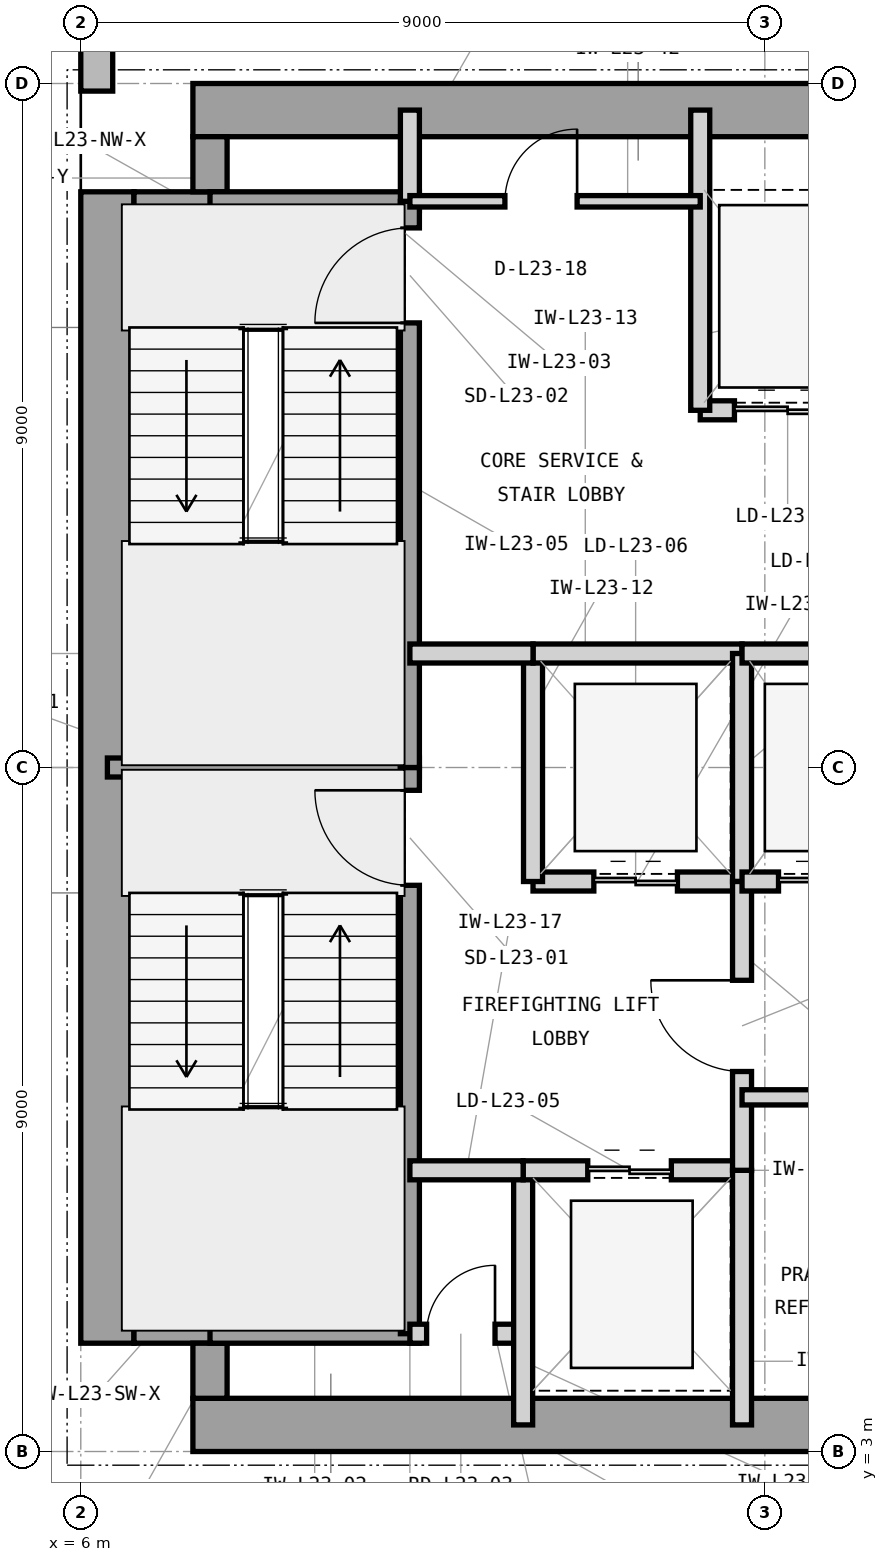
"""IFC4 building model, lengths in metres.
Left out: names, types, materials, properties, quantities, classifications, styles, units other than length and angle.
Written with IfcOpenShell. Run it as: python <this file> out.ifc"""

import sys

from ifc_helpers import new_model, si_unit, direction, frame, frame_2d, origin, place, context, subcontext, project, spatial, rectangle, extrude, element, fill, save


model = new_model("IFC4")
c1 = context("Model", 3, precision=1e-05, world=origin(), true_north=direction((0.0, 1.0)))
c2 = subcontext(c1, "Body", "Model", "MODEL_VIEW")
j1 = project(units=[si_unit("LENGTHUNIT", "METRE"), si_unit("PLANEANGLEUNIT", "RADIAN")], contexts=[c1])
p1 = place(None, origin())
s1 = spatial("IfcSite", under=j1, at=p1, CompositionType="ELEMENT")
p2 = place(p1, origin())
s2 = spatial("IfcBuilding", under=s1, at=p2, CompositionType="ELEMENT")
p3 = place(p2, frame((0.0, 0.0, 101.1)))
s3 = spatial("IfcBuildingStorey", under=s2, at=p3, CompositionType="ELEMENT", Elevation=101.1)
p4 = place(p3, frame((7.475, 3.35, 0.0), z_axis=(0.0, 0.0, 1.0), x_axis=(1.0, 0.0, 0.0)))
e1 = element("IfcWall", 1, at=p4, inside=s3, PredefinedType="SHEAR", context=c2, shape_type="SweptSolid", body=[
    extrude(rectangle(XDim=16.525, YDim=0.7, at=frame_2d((8.262, 0.0))), origin(), (0.0, 0.0, 1.0), 3.9),
])
p5 = place(p3, frame((6.35, 4.425, 0.0), z_axis=(0.0, 0.0, 1.0), x_axis=(0.0, 1.0, 0.0)))
e2 = element("IfcWall", 2, at=p5, inside=s3, PredefinedType="SHEAR", context=c2, shape_type="SweptSolid", body=[
    extrude(rectangle(XDim=15.15, YDim=0.7, at=frame_2d((7.575, 0.0))), origin(), (0.0, 0.0, 1.0), 3.9),
])
p6 = place(p3, frame((7.475, 20.65, 0.0), z_axis=(0.0, 0.0, 1.0), x_axis=(1.0, 0.0, 0.0)))
e3 = element("IfcWall", 3, at=p6, inside=s3, PredefinedType="SHEAR", context=c2, shape_type="SweptSolid", body=[
    extrude(rectangle(XDim=12.325, YDim=0.7, at=frame_2d((6.163, 0.0))), origin(), (0.0, 0.0, 1.0), 3.9),
])
p7 = place(p3, frame((6.7, 4.65, 0.0), z_axis=(0.0, 0.0, 1.0), x_axis=(1.0, 0.0, 0.0)))
e4 = element("IfcWall", 4, at=p7, inside=s3, PredefinedType="SHEAR", context=c2, shape_type="SweptSolid", body=[
    extrude(rectangle(XDim=1.225, YDim=0.45, at=frame_2d((0.613, 0.0))), origin(), (0.0, 0.0, 1.0), 3.9),
])
p8 = place(p3, frame((7.7, 3.7, 0.0), z_axis=(0.0, 0.0, 1.0), x_axis=(0.0, 1.0, 0.0)))
e5 = element("IfcWall", 5, at=p8, inside=s3, PredefinedType="SHEAR", context=c2, shape_type="SweptSolid", body=[
    extrude(rectangle(XDim=0.725, YDim=0.45, at=frame_2d((0.363, 0.0))), origin(), (0.0, 0.0, 1.0), 3.9),
])
p9 = place(p3, frame((6.7, 19.35, 0.0), z_axis=(0.0, 0.0, 1.0), x_axis=(1.0, 0.0, 0.0)))
e6 = element("IfcWall", 6, at=p9, inside=s3, PredefinedType="SHEAR", context=c2, shape_type="SweptSolid", body=[
    extrude(rectangle(XDim=1.225, YDim=0.45, at=frame_2d((0.613, 0.0))), origin(), (0.0, 0.0, 1.0), 3.9),
])
p10 = place(p3, frame((7.7, 19.575, 0.0), z_axis=(0.0, 0.0, 1.0), x_axis=(0.0, 1.0, 0.0)))
e7 = element("IfcWall", 7, at=p10, inside=s3, PredefinedType="SHEAR", context=c2, shape_type="SweptSolid", body=[
    extrude(rectangle(XDim=0.725, YDim=0.45, at=frame_2d((0.363, 0.0))), origin(), (0.0, 0.0, 1.0), 3.9),
])
p11 = place(p3, frame((6.21, 46.4, 0.0), z_axis=(0.0, 0.0, 1.0), x_axis=(0.0, -1.0, 0.0)))
e8 = element("IfcWall", 8, at=p11, inside=s3, PredefinedType="STANDARD", context=c2, shape_type="SweptSolid", body=[
    extrude(rectangle(XDim=25.5, YDim=0.42, at=frame_2d((12.75, 0.0))), origin(), (0.0, 0.0, 1.0), 3.7),
])
p12 = place(p11, frame((11.5, 0.0, 0.85)))
e9 = element("IfcOpeningElement", 9, at=p12, cuts=e8, PredefinedType="OPENING", context=c2, shape_type="SweptSolid", body=[
    extrude(rectangle(XDim=2.5, YDim=2.25, at=frame_2d((1.25, 1.125))), frame((0.0, 0.22, 0.0), z_axis=(0.0, -1.0, 0.0), x_axis=(1.0, 0.0, 0.0)), (0.0, 0.0, 1.0), 0.44),
])
p13 = place(p11, frame((5.336, 0.0, 0.85)))
e10 = element("IfcOpeningElement", 10, at=p13, cuts=e8, PredefinedType="OPENING", context=c2, shape_type="SweptSolid", body=[
    extrude(rectangle(XDim=1.2, YDim=2.25, at=frame_2d((0.6, 1.125))), frame((0.0, 0.22, 0.0), z_axis=(0.0, -1.0, 0.0), x_axis=(1.0, 0.0, 0.0)), (0.0, 0.0, 1.0), 0.44),
])
p14 = place(p3, frame((6.35, 12.0, 0.0), z_axis=(0.0, 0.0, 1.0), x_axis=(1.0, 0.0, 0.0)))
e11 = element("IfcWall", 11, at=p14, inside=s3, PredefinedType="SHEAR", context=c2, shape_type="SweptSolid", body=[
    extrude(rectangle(XDim=4.105, YDim=0.25, at=frame_2d((2.052, 0.0))), origin(), (0.0, 0.0, 1.0), 3.9),
])
for number, where, z_axis, x_axis in (
    (12, (7.7, 4.55, 0.0), (0.0, 0.0, 1.0), (1.0, 0.0, 0.0)),
    (13, (7.7, 19.45, 0.0), (0.0, 0.0, 1.0), (1.0, 0.0, 0.0)),
):
    element("IfcWall", number, at=place(p3, frame(where, z_axis=z_axis, x_axis=x_axis)), inside=s3, PredefinedType="SHEAR", context=c2, shape_type="SweptSolid", body=[
        extrude(rectangle(XDim=2.755, YDim=0.25, at=frame_2d((1.377, 0.0))), origin(), (0.0, 0.0, 1.0), 3.9),
    ])
p15 = place(p3, frame((10.33, 4.55, 0.0), z_axis=(0.0, 0.0, 1.0), x_axis=(0.0, 1.0, 0.0)))
e14 = element("IfcWall", 14, at=p15, inside=s3, PredefinedType="SHEAR", context=c2, shape_type="SweptSolid", body=[
    extrude(rectangle(XDim=7.45, YDim=0.25, at=frame_2d((3.725, 0.0))), origin(), (0.0, 0.0, 1.0), 3.9),
])
p16 = place(p15, frame((5.9, 0.0, 0.0)))
e15 = element("IfcOpeningElement", 15, at=p16, cuts=e14, PredefinedType="OPENING", context=c2, shape_type="SweptSolid", body=[
    extrude(rectangle(XDim=1.25, YDim=2.2, at=frame_2d((0.625, 1.1))), frame((0.0, 0.135, 0.0), z_axis=(0.0, -1.0, 0.0), x_axis=(1.0, 0.0, 0.0)), (0.0, 0.0, 1.0), 0.27),
])
p17 = place(p3, frame((10.33, 12.0, 0.0), z_axis=(0.0, 0.0, 1.0), x_axis=(0.0, 1.0, 0.0)))
e16 = element("IfcWall", 16, at=p17, inside=s3, PredefinedType="SHEAR", context=c2, shape_type="SweptSolid", body=[
    extrude(rectangle(XDim=7.45, YDim=0.25, at=frame_2d((3.725, 0.0))), origin(), (0.0, 0.0, 1.0), 3.9),
])
p18 = place(p17, frame((5.85, 0.0, 0.0)))
e17 = element("IfcOpeningElement", 17, at=p18, cuts=e16, PredefinedType="OPENING", context=c2, shape_type="SweptSolid", body=[
    extrude(rectangle(XDim=1.25, YDim=2.2, at=frame_2d((0.625, 1.1))), frame((0.0, 0.135, 0.0), z_axis=(0.0, -1.0, 0.0), x_axis=(1.0, 0.0, 0.0)), (0.0, 0.0, 1.0), 0.27),
])
p19 = place(p3, frame((10.33, 4.55, 0.0), z_axis=(0.0, 0.0, 1.0), x_axis=(1.0, 0.0, 0.0)))
e18 = element("IfcWall", 18, at=p19, inside=s3, PredefinedType="PARTITIONING", context=c2, shape_type="SweptSolid", body=[
    extrude(rectangle(XDim=1.49, YDim=0.25, at=frame_2d((0.745, 0.0))), origin(), (0.0, 0.0, 1.0), 3.69),
])
p20 = place(p19, frame((0.22, 0.0, 0.0)))
e19 = element("IfcOpeningElement", 19, at=p20, cuts=e18, PredefinedType="OPENING", context=c2, shape_type="SweptSolid", body=[
    extrude(rectangle(XDim=0.9, YDim=2.1, at=frame_2d((0.45, 1.05))), frame((0.0, 0.135, 0.0), z_axis=(0.0, -1.0, 0.0), x_axis=(1.0, 0.0, 0.0)), (0.0, 0.0, 1.0), 0.27),
])
p21 = place(p3, frame((11.82, 3.35, 0.0), z_axis=(0.0, 0.0, 1.0), x_axis=(0.0, 1.0, 0.0)))
e20 = element("IfcWall", 20, at=p21, inside=s3, PredefinedType="PARTITIONING", context=c2, shape_type="SweptSolid", body=[
    extrude(rectangle(XDim=3.35, YDim=0.25, at=frame_2d((1.675, 0.0))), origin(), (0.0, 0.0, 1.0), 3.69),
])
p22 = place(p3, frame((10.33, 19.45, 0.0), z_axis=(0.0, 0.0, 1.0), x_axis=(0.0, 1.0, 0.0)))
e21 = element("IfcWall", 21, at=p22, inside=s3, PredefinedType="PARTITIONING", context=c2, shape_type="SweptSolid", body=[
    extrude(rectangle(XDim=1.2, YDim=0.25, at=frame_2d((0.6, 0.0))), origin(), (0.0, 0.0, 1.0), 2.917),
])
p23 = place(p3, frame((11.82, 6.7, 0.0), z_axis=(0.0, 0.0, 1.0), x_axis=(1.0, 0.0, 0.0)))
e22 = element("IfcWall", 22, at=p23, inside=s3, PredefinedType="PARTITIONING", context=c2, shape_type="SweptSolid", body=[
    extrude(rectangle(XDim=2.88, YDim=0.25, at=frame_2d((1.44, 0.0))), origin(), (0.0, 0.0, 1.0), 3.227),
])
p24 = place(p23, frame((0.85, 0.0, 0.0)))
e23 = element("IfcOpeningElement", 23, at=p24, cuts=e22, PredefinedType="OPENING", context=c2, shape_type="SweptSolid", body=[
    extrude(rectangle(XDim=1.1, YDim=2.25, at=frame_2d((0.55, 1.125))), frame((0.0, 0.135, 0.0), z_axis=(0.0, -1.0, 0.0), x_axis=(1.0, 0.0, 0.0)), (0.0, 0.0, 1.0), 0.27),
])
p25 = place(p3, frame((14.7, 3.35, 0.0), z_axis=(0.0, 0.0, 1.0), x_axis=(0.0, 1.0, 0.0)))
e24 = element("IfcWall", 24, at=p25, inside=s3, PredefinedType="PARTITIONING", context=c2, shape_type="SweptSolid", body=[
    extrude(rectangle(XDim=3.35, YDim=0.25, at=frame_2d((1.675, 0.0))), origin(), (0.0, 0.0, 1.0), 3.69),
])
p26 = place(p3, frame((11.95, 10.5, 0.0), z_axis=(0.0, 0.0, 1.0), x_axis=(1.0, 0.0, 0.0)))
e25 = element("IfcWall", 25, at=p26, inside=s3, PredefinedType="PARTITIONING", context=c2, shape_type="SweptSolid", body=[
    extrude(rectangle(XDim=2.75, YDim=0.25, at=frame_2d((1.375, 0.0))), origin(), (0.0, 0.0, 1.0), 3.227),
])
p27 = place(p26, frame((0.8, 0.0, 0.0)))
e26 = element("IfcOpeningElement", 26, at=p27, cuts=e25, PredefinedType="OPENING", context=c2, shape_type="SweptSolid", body=[
    extrude(rectangle(XDim=1.1, YDim=2.25, at=frame_2d((0.55, 1.125))), frame((0.0, 0.135, 0.0), z_axis=(0.0, -1.0, 0.0), x_axis=(1.0, 0.0, 0.0)), (0.0, 0.0, 1.0), 0.27),
])
p28 = place(p3, frame((11.95, 10.5, 0.0), z_axis=(0.0, 0.0, 1.0), x_axis=(0.0, 1.0, 0.0)))
e27 = element("IfcWall", 27, at=p28, inside=s3, PredefinedType="PARTITIONING", context=c2, shape_type="SweptSolid", body=[
    extrude(rectangle(XDim=3.0, YDim=0.25, at=frame_2d((1.5, 0.0))), origin(), (0.0, 0.0, 1.0), 3.69),
])
p29 = place(p3, frame((11.95, 13.5, 0.0), z_axis=(0.0, 0.0, 1.0), x_axis=(1.0, 0.0, 0.0)))
e28 = element("IfcWall", 28, at=p29, inside=s3, PredefinedType="PARTITIONING", context=c2, shape_type="SweptSolid", body=[
    extrude(rectangle(XDim=2.75, YDim=0.25, at=frame_2d((1.375, 0.0))), origin(), (0.0, 0.0, 1.0), 3.227),
])
p30 = place(p3, frame((14.7, 10.5, 0.0), z_axis=(0.0, 0.0, 1.0), x_axis=(0.0, 1.0, 0.0)))
e29 = element("IfcWall", 29, at=p30, inside=s3, PredefinedType="PARTITIONING", context=c2, shape_type="SweptSolid", body=[
    extrude(rectangle(XDim=3.0, YDim=0.25, at=frame_2d((1.5, 0.0))), origin(), (0.0, 0.0, 1.0), 3.69),
])
p31 = place(p3, frame((14.7, 6.7, 0.0), z_axis=(0.0, 0.0, 1.0), x_axis=(0.0, 1.0, 0.0)))
e30 = element("IfcWall", 30, at=p31, inside=s3, PredefinedType="PARTITIONING", context=c2, shape_type="SweptSolid", body=[
    extrude(rectangle(XDim=3.8, YDim=0.25, at=frame_2d((1.9, 0.0))), origin(), (0.0, 0.0, 1.0), 3.69),
])
p32 = place(p31, frame((1.3, 0.0, 0.0)))
e31 = element("IfcOpeningElement", 31, at=p32, cuts=e30, PredefinedType="OPENING", context=c2, shape_type="SweptSolid", body=[
    extrude(rectangle(XDim=1.2, YDim=2.2, at=frame_2d((0.6, 1.1))), frame((0.0, 0.135, 0.0), z_axis=(0.0, -1.0, 0.0), x_axis=(1.0, 0.0, 0.0)), (0.0, 0.0, 1.0), 0.27),
])
p33 = place(p3, frame((10.33, 13.5, 0.0), z_axis=(0.0, 0.0, 1.0), x_axis=(1.0, 0.0, 0.0)))
e32 = element("IfcWall", 32, at=p33, inside=s3, PredefinedType="PARTITIONING", context=c2, shape_type="SweptSolid", body=[
    extrude(rectangle(XDim=1.62, YDim=0.25, at=frame_2d((0.81, 0.0))), origin(), (0.0, 0.0, 1.0), 3.227),
])
p34 = place(p3, frame((10.33, 6.7, 0.0), z_axis=(0.0, 0.0, 1.0), x_axis=(1.0, 0.0, 0.0)))
e33 = element("IfcWall", 33, at=p34, inside=s3, PredefinedType="PARTITIONING", context=c2, shape_type="SweptSolid", body=[
    extrude(rectangle(XDim=1.49, YDim=0.25, at=frame_2d((0.745, 0.0))), origin(), (0.0, 0.0, 1.0), 3.227),
])
p35 = place(p3, frame((14.15, 16.7, 0.0), z_axis=(0.0, 0.0, 1.0), x_axis=(1.0, 0.0, 0.0)))
e34 = element("IfcWall", 34, at=p35, inside=s3, PredefinedType="PARTITIONING", context=c2, shape_type="SweptSolid", body=[
    extrude(rectangle(XDim=2.3, YDim=0.25, at=frame_2d((1.15, 0.0))), origin(), (0.0, 0.0, 1.0), 3.227),
])
p36 = place(p35, frame((0.45, 0.0, 0.0)))
e35 = element("IfcOpeningElement", 35, at=p36, cuts=e34, PredefinedType="OPENING", context=c2, shape_type="SweptSolid", body=[
    extrude(rectangle(XDim=1.4, YDim=2.35, at=frame_2d((0.7, 1.175))), frame((0.0, 0.135, 0.0), z_axis=(0.0, -1.0, 0.0), x_axis=(1.0, 0.0, 0.0)), (0.0, 0.0, 1.0), 0.27),
])
p37 = place(p3, frame((14.15, 16.7, 0.0), z_axis=(0.0, 0.0, 1.0), x_axis=(0.0, 1.0, 0.0)))
e36 = element("IfcWall", 36, at=p37, inside=s3, PredefinedType="PARTITIONING", context=c2, shape_type="SweptSolid", body=[
    extrude(rectangle(XDim=3.95, YDim=0.25, at=frame_2d((1.975, 0.0))), origin(), (0.0, 0.0, 1.0), 3.69),
])
p38 = place(p3, frame((14.7, 7.66, 0.0), z_axis=(0.0, 0.0, 1.0), x_axis=(1.0, 0.0, 0.0)))
e37 = element("IfcWall", 37, at=p38, inside=s3, PredefinedType="PARTITIONING", context=c2, shape_type="SweptSolid", body=[
    extrude(rectangle(XDim=3.15, YDim=0.2, at=frame_2d((1.575, 0.0))), origin(), (0.0, 0.0, 1.0), 3.69),
])
p39 = place(p38, frame((1.075, 0.0, 0.0)))
e38 = element("IfcOpeningElement", 38, at=p39, cuts=e37, PredefinedType="OPENING", context=c2, shape_type="SweptSolid", body=[
    extrude(rectangle(XDim=1.0, YDim=2.15, at=frame_2d((0.5, 1.075))), frame((0.0, 0.11, 0.0), z_axis=(0.0, -1.0, 0.0), x_axis=(1.0, 0.0, 0.0)), (0.0, 0.0, 1.0), 0.22),
])
p40 = place(p3, frame((14.7, 10.5, 0.0), z_axis=(0.0, 0.0, 1.0), x_axis=(1.0, 0.0, 0.0)))
e39 = element("IfcWall", 39, at=p40, inside=s3, PredefinedType="PARTITIONING", context=c2, shape_type="SweptSolid", body=[
    extrude(rectangle(XDim=2.15, YDim=0.25, at=frame_2d((1.075, 0.0))), origin(), (0.0, 0.0, 1.0), 3.227),
])
p41 = place(p40, frame((0.48, 0.0, 0.0)))
e40 = element("IfcOpeningElement", 40, at=p41, cuts=e39, PredefinedType="OPENING", context=c2, shape_type="SweptSolid", body=[
    extrude(rectangle(XDim=1.15, YDim=2.25, at=frame_2d((0.575, 1.125))), frame((0.0, 0.135, 0.0), z_axis=(0.0, -1.0, 0.0), x_axis=(1.0, 0.0, 0.0)), (0.0, 0.0, 1.0), 0.27),
])
p42 = place(p3, frame((14.7, 13.5, 0.0), z_axis=(0.0, 0.0, 1.0), x_axis=(1.0, 0.0, 0.0)))
e41 = element("IfcWall", 41, at=p42, inside=s3, PredefinedType="PARTITIONING", context=c2, shape_type="SweptSolid", body=[
    extrude(rectangle(XDim=8.95, YDim=0.25, at=frame_2d((4.475, 0.0))), origin(), (0.0, 0.0, 1.0), 3.227),
])
p43 = place(p3, frame((10.33, 19.45, 0.0), z_axis=(0.0, 0.0, 1.0), x_axis=(1.0, 0.0, 0.0)))
e42 = element("IfcWall", 42, at=p43, inside=s3, PredefinedType="PARTITIONING", context=c2, shape_type="SweptSolid", body=[
    extrude(rectangle(XDim=3.82, YDim=0.15, at=frame_2d((1.91, 0.0))), origin(), (0.0, 0.0, 1.0), 3.69),
])
p44 = place(p43, frame((1.25, 0.0, 0.0)))
e43 = element("IfcOpeningElement", 43, at=p44, cuts=e42, PredefinedType="OPENING", context=c2, shape_type="SweptSolid", body=[
    extrude(rectangle(XDim=0.95, YDim=2.1, at=frame_2d((0.475, 1.05))), frame((0.0, 0.085, 0.0), z_axis=(0.0, -1.0, 0.0), x_axis=(1.0, 0.0, 0.0)), (0.0, 0.0, 1.0), 0.17),
])
p45 = place(p16, origin())
e44 = element("IfcDoor", 44, at=p45, inside=s3, OperationType="SINGLE_SWING_RIGHT", PredefinedType="DOOR", context=c2, shape_type="SweptSolid", body=[
    extrude(rectangle(XDim=1.25, YDim=2.2, at=frame_2d((0.625, 1.1))), frame((0.0, 0.025, 0.0), z_axis=(0.0, -1.0, 0.0), x_axis=(1.0, 0.0, 0.0)), (0.0, 0.0, 1.0), 0.05),
])
fill(e15, e44)
p46 = place(p18, origin())
e45 = element("IfcDoor", 45, at=p46, inside=s3, OperationType="SINGLE_SWING_LEFT", PredefinedType="DOOR", context=c2, shape_type="SweptSolid", body=[
    extrude(rectangle(XDim=1.25, YDim=2.2, at=frame_2d((0.625, 1.1))), frame((0.0, 0.025, 0.0), z_axis=(0.0, -1.0, 0.0), x_axis=(1.0, 0.0, 0.0)), (0.0, 0.0, 1.0), 0.05),
])
fill(e17, e45)
p47 = place(p20, origin())
e46 = element("IfcDoor", 46, at=p47, inside=s3, OperationType="SINGLE_SWING_RIGHT", PredefinedType="TRAPDOOR", context=c2, shape_type="SweptSolid", body=[
    extrude(rectangle(XDim=0.9, YDim=2.1, at=frame_2d((0.45, 1.05))), frame((0.0, 0.025, 0.0), z_axis=(0.0, -1.0, 0.0), x_axis=(1.0, 0.0, 0.0)), (0.0, 0.0, 1.0), 0.05),
])
fill(e19, e46)
p48 = place(p24, origin())
e47 = element("IfcDoor", 47, at=p48, inside=s3, OperationType="DOUBLE_DOOR_SLIDING", PredefinedType="DOOR", context=c2, shape_type="SweptSolid", body=[
    extrude(rectangle(XDim=1.1, YDim=2.25, at=frame_2d((0.55, 1.125))), frame((0.0, 0.025, 0.0), z_axis=(0.0, -1.0, 0.0), x_axis=(1.0, 0.0, 0.0)), (0.0, 0.0, 1.0), 0.05),
])
fill(e23, e47)
p49 = place(p27, origin())
e48 = element("IfcDoor", 48, at=p49, inside=s3, OperationType="DOUBLE_DOOR_SLIDING", PredefinedType="DOOR", context=c2, shape_type="SweptSolid", body=[
    extrude(rectangle(XDim=1.1, YDim=2.25, at=frame_2d((0.55, 1.125))), frame((0.0, 0.025, 0.0), z_axis=(0.0, -1.0, 0.0), x_axis=(1.0, 0.0, 0.0)), (0.0, 0.0, 1.0), 0.05),
])
fill(e26, e48)
p50 = place(p32, origin())
e49 = element("IfcDoor", 49, at=p50, inside=s3, OperationType="SINGLE_SWING_RIGHT", PredefinedType="DOOR", context=c2, shape_type="SweptSolid", body=[
    extrude(rectangle(XDim=1.2, YDim=2.2, at=frame_2d((0.6, 1.1))), frame((0.0, 0.025, 0.0), z_axis=(0.0, -1.0, 0.0), x_axis=(1.0, 0.0, 0.0)), (0.0, 0.0, 1.0), 0.05),
])
fill(e31, e49)
p51 = place(p36, origin())
e50 = element("IfcDoor", 50, at=p51, inside=s3, OperationType="DOUBLE_DOOR_SLIDING", PredefinedType="DOOR", context=c2, shape_type="SweptSolid", body=[
    extrude(rectangle(XDim=1.4, YDim=2.35, at=frame_2d((0.7, 1.175))), frame((0.0, 0.025, 0.0), z_axis=(0.0, -1.0, 0.0), x_axis=(1.0, 0.0, 0.0)), (0.0, 0.0, 1.0), 0.05),
])
fill(e35, e50)
p52 = place(p41, origin())
e51 = element("IfcDoor", 51, at=p52, inside=s3, OperationType="DOUBLE_DOOR_SLIDING", PredefinedType="DOOR", context=c2, shape_type="SweptSolid", body=[
    extrude(rectangle(XDim=1.15, YDim=2.25, at=frame_2d((0.575, 1.125))), frame((0.0, 0.025, 0.0), z_axis=(0.0, -1.0, 0.0), x_axis=(1.0, 0.0, 0.0)), (0.0, 0.0, 1.0), 0.05),
])
fill(e40, e51)
p53 = place(p44, origin())
e52 = element("IfcDoor", 52, at=p53, inside=s3, OperationType="SINGLE_SWING_RIGHT", PredefinedType="DOOR", context=c2, shape_type="SweptSolid", body=[
    extrude(rectangle(XDim=0.95, YDim=2.1, at=frame_2d((0.475, 1.05))), frame((0.0, 0.025, 0.0), z_axis=(0.0, -1.0, 0.0), x_axis=(1.0, 0.0, 0.0)), (0.0, 0.0, 1.0), 0.05),
])
fill(e43, e52)
save(model, sys.argv[1])
